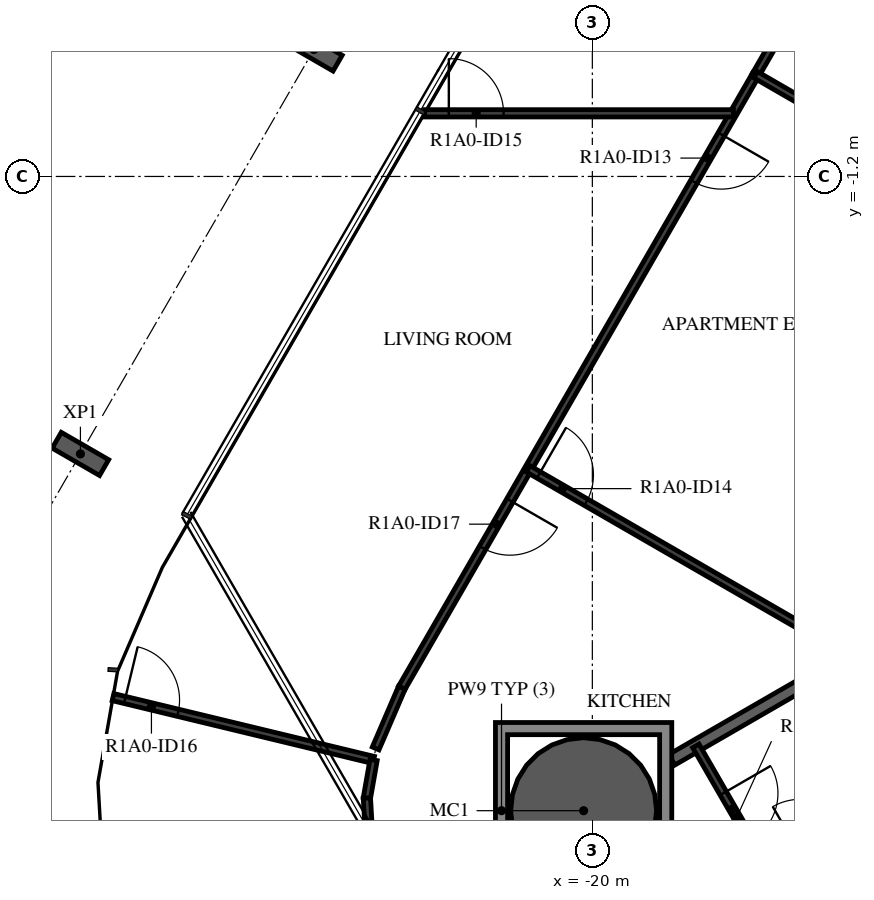
"""IFC4 building model, lengths in metres.
Left out: names, types, materials, properties, quantities, classifications, styles, units other than length and angle.
Written with IfcOpenShell. Run it as: python <this file> out.ifc"""

import sys

from ifc_helpers import new_model, si_unit, direction, frame, frame_2d, origin, origin_2d, place, context, subcontext, project, spatial, polyline, rectangle, hollow_circle, i_section, outline, extrude, element, fill, save


model = new_model("IFC4")
c1 = context("Model", 3, precision=1e-05, world=origin(), true_north=direction((0.0, 1.0)))
c2 = subcontext(c1, "Body", "Model", "MODEL_VIEW")
j1 = project(units=[si_unit("LENGTHUNIT", "METRE"), si_unit("PLANEANGLEUNIT", "RADIAN")], contexts=[c1])
p1 = place(None, origin())
s1 = spatial("IfcSite", under=j1, at=p1, CompositionType="ELEMENT")
p2 = place(p1, origin())
s2 = spatial("IfcBuilding", under=s1, at=p2, CompositionType="ELEMENT")
p3 = place(p2, frame((0.0, 0.0, 38.4)))
s3 = spatial("IfcBuildingStorey", under=s2, at=p3, CompositionType="ELEMENT", Elevation=38.4)
p4 = place(p3, frame((-20.144, -11.63, -0.45), z_axis=(0.0, 0.0, 1.0), x_axis=(1.0, 0.0, 0.0)))
e1 = element("IfcColumn", 1, at=p4, inside=s3, PredefinedType="COLUMN", context=c2, shape_type="SweptSolid", body=[
    extrude(hollow_circle(Radius=1.2, WallThickness=0.06, at=origin_2d()), origin(), (0.0, 0.0, 1.0), 3.57),
])
for number, where, z_axis, x_axis in (
    (2, (-24.579, 0.888, -0.45), (0.0, 0.0, 1.0), (0.5, 0.866, 0.0)),
    (3, (-28.419, -5.763, -0.45), (0.0, 0.0, 1.0), (0.5, 0.866, 0.0)),
):
    element("IfcColumn", number, at=place(p3, frame(where, z_axis=z_axis, x_axis=x_axis)), inside=s3, PredefinedType="COLUMN", context=c2, shape_type="SweptSolid", body=[
        extrude(i_section(OverallWidth=0.3, OverallDepth=0.9, WebThickness=0.019, FlangeThickness=0.035, FilletRadius=0.03, at=origin_2d()), origin(), (0.0, 0.0, 1.0), 3.57),
    ])
p5 = place(p3, frame((-18.694, -10.793, 0.0), z_axis=(0.0, 0.0, 1.0), x_axis=(0.86603400694, 0.499985098601, 0.0)))
e4 = element("IfcWall", 4, at=p5, inside=s3, PredefinedType="STANDARD", context=c2, shape_type="SweptSolid", body=[
    extrude(rectangle(XDim=7.885, YDim=0.2, at=frame_2d((3.943, 0.0))), origin(), (0.0, 0.0, 1.0), 3.12),
])
p6 = place(p3, frame((-13.572, 6.953, 0.0), z_axis=(0.0, 0.0, 1.0), x_axis=(-0.499981332661, -0.866036181109, 0.0)))
e5 = element("IfcWall", 5, at=p6, inside=s3, PredefinedType="PARTITIONING", context=c2, shape_type="SweptSolid", body=[
    extrude(rectangle(XDim=7.483, YDim=0.12, at=frame_2d((3.742, 0.0))), origin(), (0.0, 0.0, 1.0), 3.12),
])
p7 = place(p3, frame((-17.313, 0.472, 0.0), z_axis=(0.0, 0.0, 1.0), x_axis=(-0.499999047218, -0.866025953873, 0.0)))
e6 = element("IfcWall", 6, at=p7, inside=s3, PredefinedType="PARTITIONING", context=c2, shape_type="SweptSolid", body=[
    extrude(rectangle(XDim=11.639, YDim=0.12, at=frame_2d((5.82, 0.0))), origin(), (0.0, 0.0, 1.0), 3.12),
])
p8 = place(p7, frame((1.132, 0.0, 0.0)))
e7 = element("IfcOpeningElement", 7, at=p8, cuts=e6, PredefinedType="OPENING", context=c2, shape_type="SweptSolid", body=[
    extrude(rectangle(XDim=0.9, YDim=2.1, at=frame_2d((0.45, 1.05))), frame((0.0, 0.07, 0.0), z_axis=(0.0, -1.0, 0.0), x_axis=(1.0, 0.0, 0.0)), (0.0, 0.0, 1.0), 0.14),
])
p9 = place(p7, frame((8.083, 0.0, 0.0)))
e8 = element("IfcOpeningElement", 8, at=p9, cuts=e6, PredefinedType="OPENING", context=c2, shape_type="SweptSolid", body=[
    extrude(rectangle(XDim=0.9, YDim=2.1, at=frame_2d((0.45, 1.05))), frame((0.0, 0.07, 0.0), z_axis=(0.0, -1.0, 0.0), x_axis=(1.0, 0.0, 0.0)), (0.0, 0.0, 1.0), 0.14),
])
p10 = place(p3, frame((-15.2, -0.748, 0.0), z_axis=(0.0, 0.0, 1.0), x_axis=(-0.866030657337, 0.49999090047, 0.0)))
e9 = element("IfcWall", 9, at=p10, inside=s3, PredefinedType="PARTITIONING", context=c2, shape_type="SweptSolid", body=[
    extrude(rectangle(XDim=2.44, YDim=0.12, at=frame_2d((1.22, 0.0))), origin(), (0.0, 0.0, 1.0), 3.12),
])
p11 = place(p3, frame((-21.055, -6.009, 0.0), z_axis=(0.0, 0.0, 1.0), x_axis=(0.866030172657, -0.49999173998, 0.0)))
e10 = element("IfcWall", 10, at=p11, inside=s3, PredefinedType="PARTITIONING", context=c2, shape_type="SweptSolid", body=[
    extrude(rectangle(XDim=6.147, YDim=0.12, at=frame_2d((3.074, 0.0))), origin(), (0.0, 0.0, 1.0), 3.12),
])
p12 = place(p11, frame((0.2, 0.0, 0.0)))
e11 = element("IfcOpeningElement", 11, at=p12, cuts=e10, PredefinedType="OPENING", context=c2, shape_type="SweptSolid", body=[
    extrude(rectangle(XDim=0.9, YDim=2.1, at=frame_2d((0.45, 1.05))), frame((0.0, 0.07, 0.0), z_axis=(0.0, -1.0, 0.0), x_axis=(1.0, 0.0, 0.0)), (0.0, 0.0, 1.0), 0.14),
])
p13 = place(p3, frame((-22.76, -0.162, 0.0), z_axis=(0.0, 0.0, 1.0), x_axis=(1.0, 0.0, 0.0)))
e12 = element("IfcWall", 12, at=p13, inside=s3, PredefinedType="PARTITIONING", context=c2, shape_type="SweptSolid", body=[
    extrude(rectangle(XDim=5.081, YDim=0.12, at=frame_2d((2.54, 0.0))), origin(), (0.0, 0.0, 1.0), 3.12),
])
p14 = place(p13, frame((0.4, 0.0, 0.0)))
e13 = element("IfcOpeningElement", 13, at=p14, cuts=e12, PredefinedType="OPENING", context=c2, shape_type="SweptSolid", body=[
    extrude(rectangle(XDim=0.9, YDim=2.1, at=frame_2d((0.45, 1.05))), frame((0.0, 0.07, 0.0), z_axis=(0.0, -1.0, 0.0), x_axis=(1.0, 0.0, 0.0)), (0.0, 0.0, 1.0), 0.14),
])
p15 = place(p3, frame((-23.564, -10.606, 0.0), z_axis=(0.0, 0.0, 1.0), x_axis=(0.396195073027, 0.918166359713, 0.0)))
e14 = element("IfcWall", 14, at=p15, inside=s3, PredefinedType="PARTITIONING", context=c2, shape_type="SweptSolid", body=[
    extrude(rectangle(XDim=1.087, YDim=0.12, at=frame_2d((0.543, 0.0))), origin(), (0.0, 0.0, 1.0), 3.12),
])
p16 = place(p3, frame((-27.883, -9.762, 0.0), z_axis=(0.0, 0.0, 1.0), x_axis=(0.972097015458, -0.234579181809, 0.0)))
e15 = element("IfcWall", 15, at=p16, inside=s3, PredefinedType="PARTITIONING", context=c2, shape_type="SweptSolid", body=[
    extrude(rectangle(XDim=4.409, YDim=0.12, at=frame_2d((2.204, 0.0))), origin(), (0.0, 0.0, 1.0), 3.12),
])
p17 = place(p16, frame((0.2, 0.0, 0.0)))
e16 = element("IfcOpeningElement", 16, at=p17, cuts=e15, PredefinedType="OPENING", context=c2, shape_type="SweptSolid", body=[
    extrude(rectangle(XDim=0.9, YDim=2.1, at=frame_2d((0.45, 1.05))), frame((0.0, 0.07, 0.0), z_axis=(0.0, -1.0, 0.0), x_axis=(1.0, 0.0, 0.0)), (0.0, 0.0, 1.0), 0.14),
])
p18 = place(p3, frame((-23.597, -10.796, 0.0), z_axis=(0.0, 0.0, 1.0), x_axis=(-0.173610040386, -0.984814476882, 0.0)))
e17 = element("IfcWall", 17, at=p18, inside=s3, PredefinedType="PARTITIONING", context=c2, shape_type="SweptSolid", body=[
    extrude(rectangle(XDim=0.636, YDim=0.12, at=frame_2d((0.318, 0.0))), origin(), (0.0, 0.0, 1.0), 3.12),
])
p19 = place(p3, frame((-23.708, -11.422, 0.0), z_axis=(0.0, 0.0, 1.0), x_axis=(0.058031280246, -0.998314765248, 0.0)))
e18 = element("IfcWall", 18, at=p19, inside=s3, PredefinedType="PARTITIONING", context=c2, shape_type="SweptSolid", body=[
    extrude(rectangle(XDim=0.829, YDim=0.12, at=frame_2d((0.415, 0.0))), origin(), (0.0, 0.0, 1.0), 3.12),
])
p20 = place(p3, frame((-18.298, -10.564, 0.0), z_axis=(0.0, 0.0, 1.0), x_axis=(0.500048565365, -0.865997362742, 0.0)))
e19 = element("IfcWall", 19, at=p20, inside=s3, PredefinedType="PARTITIONING", context=c2, shape_type="SweptSolid", body=[
    extrude(rectangle(XDim=2.398, YDim=0.12, at=frame_2d((1.199, 0.0))), origin(), (0.0, 0.0, 1.0), 3.12),
])
p21 = place(p20, frame((0.9, 0.0, 0.0)))
e20 = element("IfcOpeningElement", 20, at=p21, cuts=e19, PredefinedType="OPENING", context=c2, shape_type="SweptSolid", body=[
    extrude(rectangle(XDim=0.9, YDim=2.1, at=frame_2d((0.45, 1.05))), frame((0.0, 0.07, 0.0), z_axis=(0.0, -1.0, 0.0), x_axis=(1.0, 0.0, 0.0)), (0.0, 0.0, 1.0), 0.14),
])
p22 = place(p3, frame((-17.099, -12.641, 0.0), z_axis=(0.0, 0.0, 1.0), x_axis=(0.866027165828, 0.499996948039, 0.0)))
e21 = element("IfcWall", 21, at=p22, inside=s3, PredefinedType="PARTITIONING", context=c2, shape_type="SweptSolid", body=[
    extrude(rectangle(XDim=5.928, YDim=0.12, at=frame_2d((2.964, 0.0))), origin(), (0.0, 0.0, 1.0), 3.12),
])
p23 = place(p22, frame((0.595, 0.0, 0.0)))
e22 = element("IfcOpeningElement", 22, at=p23, cuts=e21, PredefinedType="OPENING", context=c2, shape_type="SweptSolid", body=[
    extrude(rectangle(XDim=0.9, YDim=2.1, at=frame_2d((0.45, 1.05))), frame((0.0, 0.07, 0.0), z_axis=(0.0, -1.0, 0.0), x_axis=(1.0, 0.0, 0.0)), (0.0, 0.0, 1.0), 0.14),
])
p24 = place(p3, origin())
e23 = element("IfcWall", 23, at=p24, inside=s3, PredefinedType="STANDARD", context=c2, shape_type="SweptSolid", body=[
    extrude(outline(polyline([(-18.694, -10.18), (-18.694, -13.08), (-21.594, -13.08), (-21.594, -10.18), (-18.694, -10.18)]), holes=[polyline([(-21.394, -12.88), (-18.894, -12.88), (-18.894, -10.38), (-21.394, -10.38), (-21.394, -12.88)])]), origin(), (0.0, 0.0, 1.0), 3.12),
])
p25 = place(p8, origin())
e24 = element("IfcDoor", 24, at=p25, inside=s3, OperationType="SINGLE_SWING_RIGHT", PredefinedType="DOOR", context=c2, shape_type="SweptSolid", body=[
    extrude(rectangle(XDim=0.9, YDim=2.1, at=frame_2d((0.45, 1.05))), frame((0.0, 0.025, 0.0), z_axis=(0.0, -1.0, 0.0), x_axis=(1.0, 0.0, 0.0)), (0.0, 0.0, 1.0), 0.05),
])
fill(e7, e24)
p26 = place(p12, origin())
e25 = element("IfcDoor", 25, at=p26, inside=s3, OperationType="SINGLE_SWING_RIGHT", PredefinedType="DOOR", context=c2, shape_type="SweptSolid", body=[
    extrude(rectangle(XDim=0.9, YDim=2.1, at=frame_2d((0.45, 1.05))), frame((0.0, 0.025, 0.0), z_axis=(0.0, -1.0, 0.0), x_axis=(1.0, 0.0, 0.0)), (0.0, 0.0, 1.0), 0.05),
])
fill(e11, e25)
p27 = place(p14, origin())
e26 = element("IfcDoor", 26, at=p27, inside=s3, OperationType="SINGLE_SWING_LEFT", PredefinedType="DOOR", context=c2, shape_type="SweptSolid", body=[
    extrude(rectangle(XDim=0.9, YDim=2.1, at=frame_2d((0.45, 1.05))), frame((0.0, 0.025, 0.0), z_axis=(0.0, -1.0, 0.0), x_axis=(1.0, 0.0, 0.0)), (0.0, 0.0, 1.0), 0.05),
])
fill(e13, e26)
p28 = place(p17, origin())
e27 = element("IfcDoor", 27, at=p28, inside=s3, OperationType="SINGLE_SWING_RIGHT", PredefinedType="DOOR", context=c2, shape_type="SweptSolid", body=[
    extrude(rectangle(XDim=0.9, YDim=2.1, at=frame_2d((0.45, 1.05))), frame((0.0, 0.025, 0.0), z_axis=(0.0, -1.0, 0.0), x_axis=(1.0, 0.0, 0.0)), (0.0, 0.0, 1.0), 0.05),
])
fill(e16, e27)
p29 = place(p9, origin())
e28 = element("IfcDoor", 28, at=p29, inside=s3, OperationType="SINGLE_SWING_LEFT", PredefinedType="DOOR", context=c2, shape_type="SweptSolid", body=[
    extrude(rectangle(XDim=0.9, YDim=2.1, at=frame_2d((0.45, 1.05))), frame((0.0, 0.025, 0.0), z_axis=(0.0, -1.0, 0.0), x_axis=(1.0, 0.0, 0.0)), (0.0, 0.0, 1.0), 0.05),
])
fill(e8, e28)
p30 = place(p21, origin())
e29 = element("IfcDoor", 29, at=p30, inside=s3, OperationType="SINGLE_SWING_LEFT", PredefinedType="DOOR", context=c2, shape_type="SweptSolid", body=[
    extrude(rectangle(XDim=0.9, YDim=2.1, at=frame_2d((0.45, 1.05))), frame((0.0, 0.025, 0.0), z_axis=(0.0, -1.0, 0.0), x_axis=(1.0, 0.0, 0.0)), (0.0, 0.0, 1.0), 0.05),
])
fill(e20, e29)
save(model, sys.argv[1])
